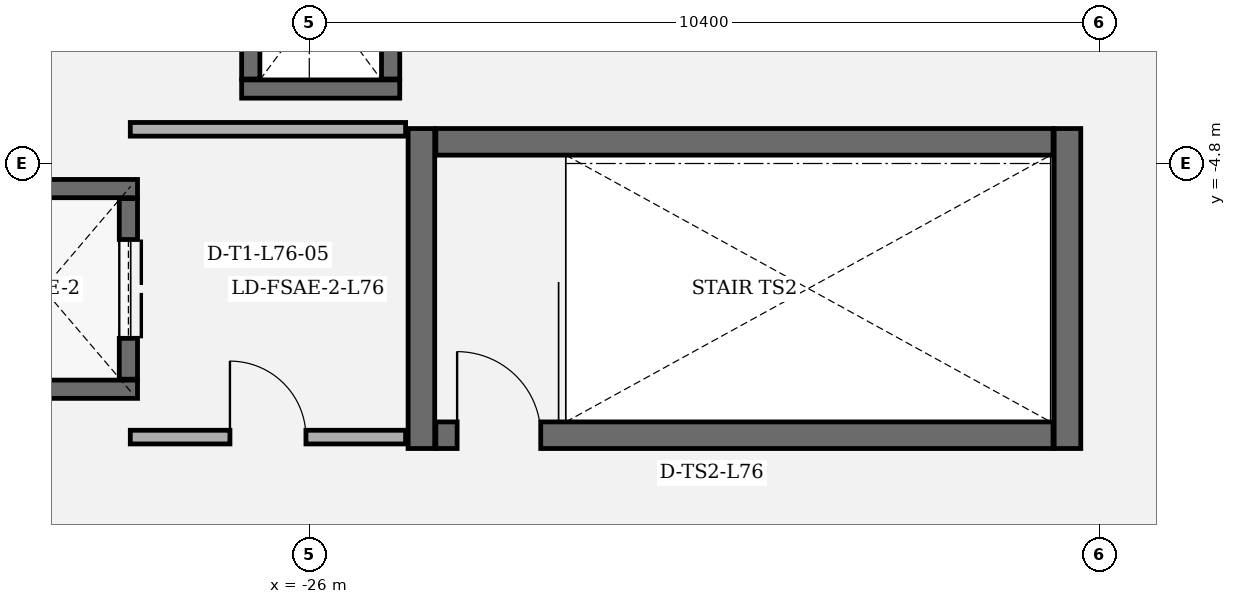
"""IFC4 building model, lengths in metres.
Left out: names, types, materials, properties, quantities, classifications, styles, units other than length and angle.
Written with IfcOpenShell. Run it as: python <this file> out.ifc"""

import sys

from ifc_helpers import new_model, si_unit, direction, frame, frame_2d, origin, place, context, subcontext, project, spatial, rectangle, extrude, element, fill, save


model = new_model("IFC4")
c1 = context("Model", 3, precision=1e-05, world=origin(), true_north=direction((0.0, 1.0)))
c2 = subcontext(c1, "Body", "Model", "MODEL_VIEW")
j1 = project(units=[si_unit("LENGTHUNIT", "METRE"), si_unit("PLANEANGLEUNIT", "RADIAN")], contexts=[c1])
p1 = place(None, origin())
s1 = spatial("IfcSite", under=j1, at=p1, CompositionType="ELEMENT")
p2 = place(p1, origin())
s2 = spatial("IfcBuilding", under=s1, at=p2, CompositionType="ELEMENT")
p3 = place(p2, frame((0.0, 0.0, 327.0)))
s3 = spatial("IfcBuildingStorey", under=s2, at=p3, CompositionType="ELEMENT", Elevation=327.0)
for number, where, z_axis, x_axis in (
    (1, (-24.525, -4.34, 0.0), (0.0, 0.0, 1.0), (0.0, -1.0, 0.0)),
    (2, (-16.025, -8.55, 0.0), (0.0, 0.0, 1.0), (0.0, 1.0, 0.0)),
):
    element("IfcWall", number, at=place(p3, frame(where, z_axis=z_axis, x_axis=x_axis)), inside=s3, PredefinedType="SHEAR", context=c2, shape_type="SweptSolid", body=[
        extrude(rectangle(XDim=4.21, YDim=0.35, at=frame_2d((2.105, 0.0))), origin(), (0.0, 0.0, 1.0), 3.92),
    ])
p4 = place(p3, frame((-24.335, -8.375, 0.0), z_axis=(0.0, 0.0, 1.0), x_axis=(1.0, 0.0, 0.0)))
e3 = element("IfcWall", 3, at=p4, inside=s3, PredefinedType="SHEAR", context=c2, shape_type="SweptSolid", body=[
    extrude(rectangle(XDim=8.12, YDim=0.35, at=frame_2d((4.06, 0.0))), origin(), (0.0, 0.0, 1.0), 3.92),
])
p5 = place(p4, frame((0.28, 0.0, 0.0)))
e4 = element("IfcOpeningElement", 4, at=p5, cuts=e3, PredefinedType="OPENING", context=c2, shape_type="SweptSolid", body=[
    extrude(rectangle(XDim=1.1, YDim=2.2, at=frame_2d((0.55, 1.1))), frame((0.0, 0.185, 0.0), z_axis=(0.0, -1.0, 0.0), x_axis=(1.0, 0.0, 0.0)), (0.0, 0.0, 1.0), 0.37),
])
p6 = place(p3, frame((-16.215, -4.515, 0.0), z_axis=(0.0, 0.0, 1.0), x_axis=(-1.0, 0.0, 0.0)))
e5 = element("IfcWall", 5, at=p6, inside=s3, PredefinedType="SHEAR", context=c2, shape_type="SweptSolid", body=[
    extrude(rectangle(XDim=8.12, YDim=0.35, at=frame_2d((4.06, 0.0))), origin(), (0.0, 0.0, 1.0), 3.92),
])
for number, where, z_axis, x_axis in (
    (6, (-28.26, -7.77, 0.0), (0.0, 0.0, 1.0), (-1.0, 0.0, 0.0)),
    (7, (-30.74, -5.13, 0.0), (0.0, 0.0, 1.0), (1.0, 0.0, 0.0)),
):
    element("IfcWall", number, at=place(p3, frame(where, z_axis=z_axis, x_axis=x_axis)), inside=s3, PredefinedType="SHEAR", context=c2, shape_type="SweptSolid", body=[
        extrude(rectangle(XDim=2.48, YDim=0.24, at=frame_2d((1.24, 0.0))), origin(), (0.0, 0.0, 1.0), 3.92),
    ])
p7 = place(p3, frame((-28.38, -5.262, 0.0), z_axis=(0.0, 0.0, 1.0), x_axis=(0.0, -1.0, 0.0)))
e8 = element("IfcWall", 8, at=p7, inside=s3, PredefinedType="SHEAR", context=c2, shape_type="SweptSolid", body=[
    extrude(rectangle(XDim=2.376, YDim=0.24, at=frame_2d((1.188, 0.0))), origin(), (0.0, 0.0, 1.0), 3.92),
])
p8 = place(p7, frame((0.538, 0.0, 0.0)))
e9 = element("IfcOpeningElement", 9, at=p8, cuts=e8, PredefinedType="OPENING", context=c2, shape_type="SweptSolid", body=[
    extrude(rectangle(XDim=1.3, YDim=2.3, at=frame_2d((0.65, 1.15))), frame((0.0, 0.13, 0.0), z_axis=(0.0, -1.0, 0.0), x_axis=(1.0, 0.0, 0.0)), (0.0, 0.0, 1.0), 0.26),
])
p9 = place(p3, frame((-24.81, -3.82, 0.0), z_axis=(0.0, 0.0, 1.0), x_axis=(-1.0, 0.0, 0.0)))
e10 = element("IfcWall", 10, at=p9, inside=s3, PredefinedType="SHEAR", context=c2, shape_type="SweptSolid", body=[
    extrude(rectangle(XDim=2.08, YDim=0.24, at=frame_2d((1.04, 0.0))), origin(), (0.0, 0.0, 1.0), 3.92),
])
for number, where, z_axis, x_axis in (
    (11, (-26.77, -3.688, 0.0), (0.0, 0.0, 1.0), (0.0, 1.0, 0.0)),
    (12, (-24.93, -1.562, 0.0), (0.0, 0.0, 1.0), (0.0, -1.0, 0.0)),
):
    element("IfcWall", number, at=place(p3, frame(where, z_axis=z_axis, x_axis=x_axis)), inside=s3, PredefinedType="SHEAR", context=c2, shape_type="SweptSolid", body=[
        extrude(rectangle(XDim=2.126, YDim=0.24, at=frame_2d((1.063, 0.0))), origin(), (0.0, 0.0, 1.0), 3.92),
    ])
p10 = place(p3, frame((-28.355, -8.4, 0.0), z_axis=(0.0, 0.0, 1.0), x_axis=(1.0, 0.0, 0.0)))
e13 = element("IfcWall", 13, at=p10, inside=s3, PredefinedType="PARTITIONING", context=c2, shape_type="SweptSolid", body=[
    extrude(rectangle(XDim=3.622, YDim=0.18, at=frame_2d((1.811, 0.0))), origin(), (0.0, 0.0, 1.0), 3.92),
])
p11 = place(p10, frame((1.311, 0.0, 0.0)))
e14 = element("IfcOpeningElement", 14, at=p11, cuts=e13, PredefinedType="OPENING", context=c2, shape_type="SweptSolid", body=[
    extrude(rectangle(XDim=1.0, YDim=2.15, at=frame_2d((0.5, 1.075))), frame((0.0, 0.1, 0.0), z_axis=(0.0, -1.0, 0.0), x_axis=(1.0, 0.0, 0.0)), (0.0, 0.0, 1.0), 0.2),
])
p12 = place(p3, frame((-24.733, -4.35, 0.0), z_axis=(0.0, 0.0, 1.0), x_axis=(-1.0, 0.0, 0.0)))
e15 = element("IfcWall", 15, at=p12, inside=s3, PredefinedType="PARTITIONING", context=c2, shape_type="SweptSolid", body=[
    extrude(rectangle(XDim=3.622, YDim=0.18, at=frame_2d((1.811, 0.0))), origin(), (0.0, 0.0, 1.0), 3.92),
])
p13 = place(p5, origin())
e16 = element("IfcDoor", 16, at=p13, inside=s3, OperationType="SINGLE_SWING_LEFT", PredefinedType="DOOR", context=c2, shape_type="SweptSolid", body=[
    extrude(rectangle(XDim=1.1, YDim=2.2, at=frame_2d((0.55, 1.1))), frame((0.0, 0.025, 0.0), z_axis=(0.0, -1.0, 0.0), x_axis=(1.0, 0.0, 0.0)), (0.0, 0.0, 1.0), 0.05),
])
fill(e4, e16)
p14 = place(p8, origin())
e17 = element("IfcDoor", 17, at=p14, inside=s3, OperationType="DOUBLE_DOOR_SLIDING", PredefinedType="DOOR", context=c2, shape_type="SweptSolid", body=[
    extrude(rectangle(XDim=1.3, YDim=2.3, at=frame_2d((0.65, 1.15))), frame((0.0, 0.025, 0.0), z_axis=(0.0, -1.0, 0.0), x_axis=(1.0, 0.0, 0.0)), (0.0, 0.0, 1.0), 0.05),
])
fill(e9, e17)
p15 = place(p11, origin())
e18 = element("IfcDoor", 18, at=p15, inside=s3, OperationType="SINGLE_SWING_LEFT", PredefinedType="DOOR", context=c2, shape_type="SweptSolid", body=[
    extrude(rectangle(XDim=1.0, YDim=2.15, at=frame_2d((0.5, 1.075))), frame((0.0, 0.025, 0.0), z_axis=(0.0, -1.0, 0.0), x_axis=(1.0, 0.0, 0.0)), (0.0, 0.0, 1.0), 0.05),
])
fill(e14, e18)
save(model, sys.argv[1])
